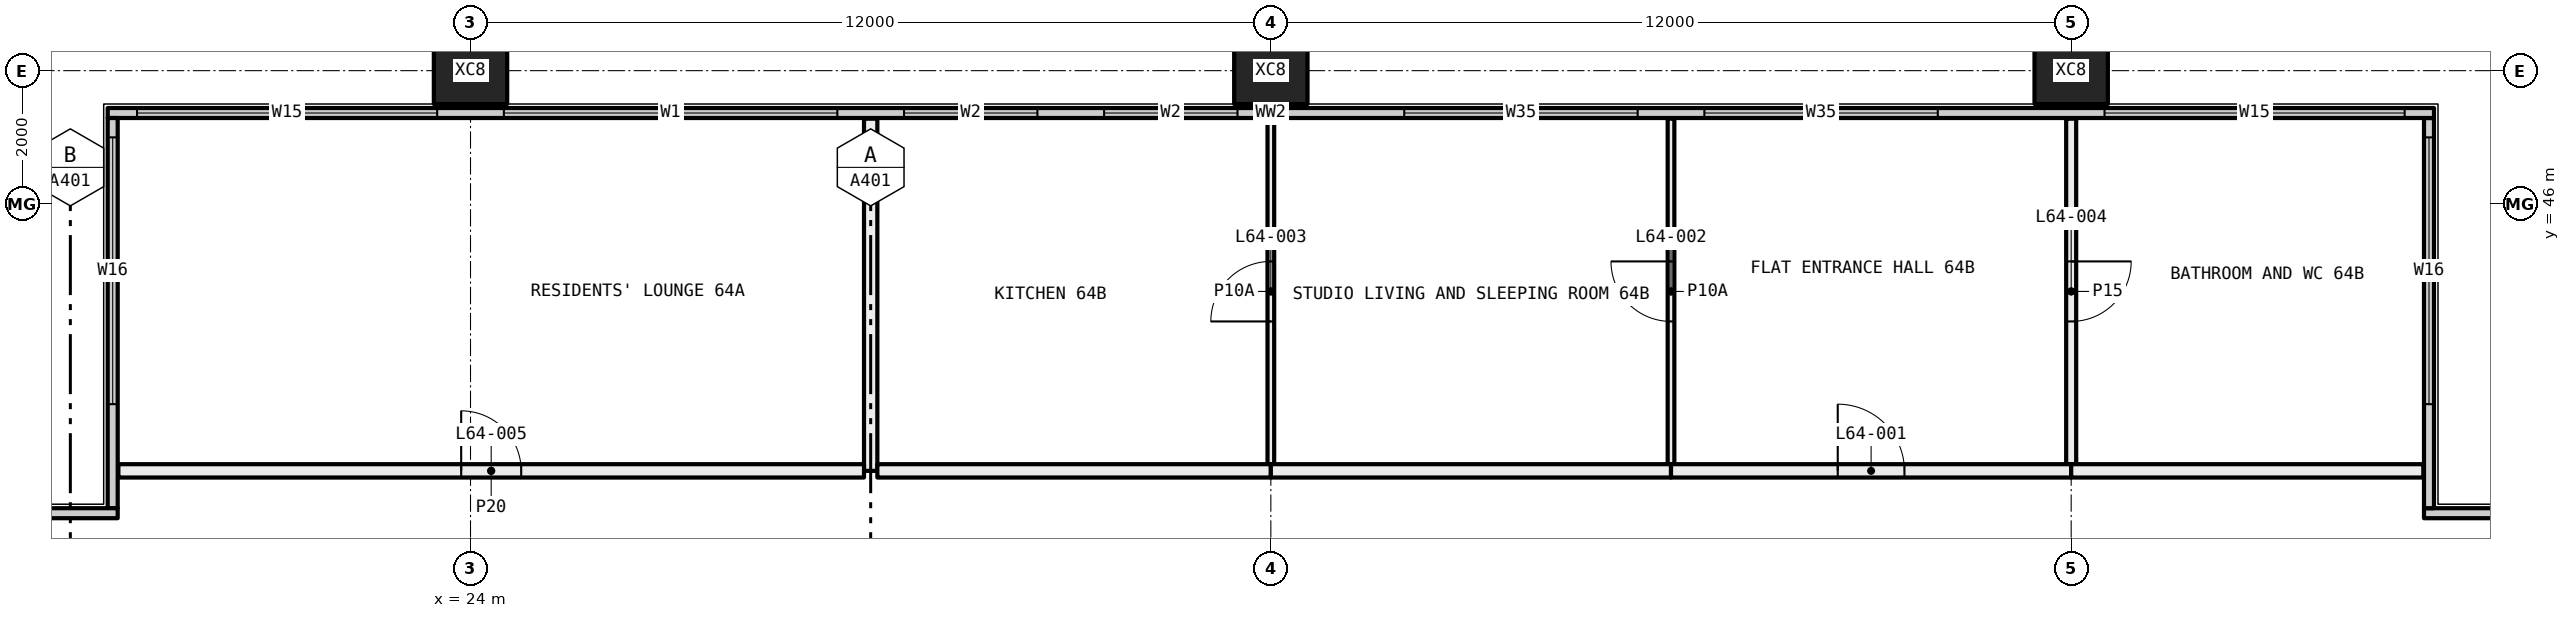
"""IFC4 building model, lengths in metres.
Left out: names, types, materials, properties, quantities, classifications, styles, units other than length and angle.
Written with IfcOpenShell. Run it as: python <this file> out.ifc"""

import sys

from ifc_helpers import new_model, si_unit, direction, frame, frame_2d, origin, origin_2d, place, context, subcontext, project, spatial, rectangle, hollow_rectangle, extrude, element, fill, save


model = new_model("IFC4")
c1 = context("Model", 3, precision=1e-05, world=origin(), true_north=direction((0.0, 1.0)))
c2 = subcontext(c1, "Body", "Model", "MODEL_VIEW")
j1 = project(units=[si_unit("LENGTHUNIT", "METRE"), si_unit("PLANEANGLEUNIT", "RADIAN")], contexts=[c1])
p1 = place(None, origin())
s1 = spatial("IfcSite", under=j1, at=p1, CompositionType="ELEMENT")
p2 = place(p1, origin())
s2 = spatial("IfcBuilding", under=s1, at=p2, CompositionType="ELEMENT")
p3 = place(p2, frame((0.0, 0.0, 238.65)))
s3 = spatial("IfcBuildingStorey", under=s2, at=p3, CompositionType="ELEMENT", Elevation=238.65)
for number, where, z_axis, x_axis in (
    (1, (24.0, 48.0, -0.4), (0.0, 0.0, 1.0), (1.0, 0.0, 0.0)),
    (2, (36.0, 48.0, -0.4), (0.0, 0.0, 1.0), (1.0, 0.0, 0.0)),
    (3, (48.0, 48.0, -0.4), (0.0, 0.0, 1.0), (1.0, 0.0, 0.0)),
):
    element("IfcColumn", number, at=place(p3, frame(where, z_axis=z_axis, x_axis=x_axis)), inside=s3, PredefinedType="COLUMN", context=c2, shape_type="SweptSolid", body=[
        extrude(hollow_rectangle(XDim=1.1, YDim=1.0, WallThickness=0.04, at=origin_2d()), origin(), (0.0, 0.0, 1.0), 3.45),
    ])
p4 = place(p3, frame((53.29, 41.365, 0.0), z_axis=(0.0, 0.0, 1.0), x_axis=(1.0, 0.0, 0.0)))
e4 = element("IfcWall", 4, at=p4, inside=s3, PredefinedType="ELEMENTEDWALL", context=c2, shape_type="SweptSolid", body=[
    extrude(rectangle(XDim=6.15, YDim=0.15, at=frame_2d((3.075, 0.0))), origin(), (0.0, 0.0, 1.0), 3.05),
])
p5 = place(p4, frame((1.71, 0.0, 0.45)))
e5 = element("IfcOpeningElement", 5, at=p5, cuts=e4, PredefinedType="OPENING", context=c2, shape_type="SweptSolid", body=[
    extrude(rectangle(XDim=4.0, YDim=2.55, at=frame_2d((2.0, 1.275))), frame((0.0, 0.085, 0.0), z_axis=(0.0, -1.0, 0.0), x_axis=(1.0, 0.0, 0.0)), (0.0, 0.0, 1.0), 0.17),
])
p6 = place(p3, frame((53.365, 41.44, 0.0), z_axis=(0.0, 0.0, 1.0), x_axis=(0.0, 1.0, 0.0)))
e6 = element("IfcWall", 6, at=p6, inside=s3, PredefinedType="ELEMENTEDWALL", context=c2, shape_type="SweptSolid", body=[
    extrude(rectangle(XDim=5.85, YDim=0.15, at=frame_2d((2.925, 0.0))), origin(), (0.0, 0.0, 1.0), 3.05),
])
p7 = place(p6, frame((1.56, 0.0, 0.45)))
e7 = element("IfcOpeningElement", 7, at=p7, cuts=e6, PredefinedType="OPENING", context=c2, shape_type="SweptSolid", body=[
    extrude(rectangle(XDim=4.0, YDim=2.55, at=frame_2d((2.0, 1.275))), frame((0.0, 0.085, 0.0), z_axis=(0.0, -1.0, 0.0), x_axis=(1.0, 0.0, 0.0)), (0.0, 0.0, 1.0), 0.17),
])
p8 = place(p3, frame((18.56, 47.365, 0.0), z_axis=(0.0, 0.0, 1.0), x_axis=(1.0, 0.0, 0.0)))
e8 = element("IfcWall", 8, at=p8, inside=s3, PredefinedType="ELEMENTEDWALL", context=c2, shape_type="SweptSolid", body=[
    extrude(rectangle(XDim=34.88, YDim=0.15, at=frame_2d((17.44, 0.0))), origin(), (0.0, 0.0, 1.0), 3.05),
])
p9 = place(p8, frame((0.44, 0.0, 0.45)))
e9 = element("IfcOpeningElement", 9, at=p9, cuts=e8, PredefinedType="OPENING", context=c2, shape_type="SweptSolid", body=[
    extrude(rectangle(XDim=4.5, YDim=2.55, at=frame_2d((2.25, 1.275))), frame((0.0, 0.085, 0.0), z_axis=(0.0, -1.0, 0.0), x_axis=(1.0, 0.0, 0.0)), (0.0, 0.0, 1.0), 0.17),
])
p10 = place(p8, frame((5.94, 0.0, 0.45)))
e10 = element("IfcOpeningElement", 10, at=p10, cuts=e8, PredefinedType="OPENING", context=c2, shape_type="SweptSolid", body=[
    extrude(rectangle(XDim=5.0, YDim=2.55, at=frame_2d((2.5, 1.275))), frame((0.0, 0.085, 0.0), z_axis=(0.0, -1.0, 0.0), x_axis=(1.0, 0.0, 0.0)), (0.0, 0.0, 1.0), 0.17),
])
p11 = place(p8, frame((11.94, 0.0, 0.45)))
e11 = element("IfcOpeningElement", 11, at=p11, cuts=e8, PredefinedType="OPENING", context=c2, shape_type="SweptSolid", body=[
    extrude(rectangle(XDim=2.0, YDim=2.55, at=frame_2d((1.0, 1.275))), frame((0.0, 0.085, 0.0), z_axis=(0.0, -1.0, 0.0), x_axis=(1.0, 0.0, 0.0)), (0.0, 0.0, 1.0), 0.17),
])
p12 = place(p8, frame((14.94, 0.0, 0.45)))
e12 = element("IfcOpeningElement", 12, at=p12, cuts=e8, PredefinedType="OPENING", context=c2, shape_type="SweptSolid", body=[
    extrude(rectangle(XDim=2.0, YDim=2.55, at=frame_2d((1.0, 1.275))), frame((0.0, 0.085, 0.0), z_axis=(0.0, -1.0, 0.0), x_axis=(1.0, 0.0, 0.0)), (0.0, 0.0, 1.0), 0.17),
])
p13 = place(p8, frame((19.44, 0.0, 0.45)))
e13 = element("IfcOpeningElement", 13, at=p13, cuts=e8, PredefinedType="OPENING", context=c2, shape_type="SweptSolid", body=[
    extrude(rectangle(XDim=3.5, YDim=2.55, at=frame_2d((1.75, 1.275))), frame((0.0, 0.085, 0.0), z_axis=(0.0, -1.0, 0.0), x_axis=(1.0, 0.0, 0.0)), (0.0, 0.0, 1.0), 0.17),
])
p14 = place(p8, frame((23.94, 0.0, 0.45)))
e14 = element("IfcOpeningElement", 14, at=p14, cuts=e8, PredefinedType="OPENING", context=c2, shape_type="SweptSolid", body=[
    extrude(rectangle(XDim=3.5, YDim=2.55, at=frame_2d((1.75, 1.275))), frame((0.0, 0.085, 0.0), z_axis=(0.0, -1.0, 0.0), x_axis=(1.0, 0.0, 0.0)), (0.0, 0.0, 1.0), 0.17),
])
p15 = place(p8, frame((29.94, 0.0, 0.45)))
e15 = element("IfcOpeningElement", 15, at=p15, cuts=e8, PredefinedType="OPENING", context=c2, shape_type="SweptSolid", body=[
    extrude(rectangle(XDim=4.5, YDim=2.55, at=frame_2d((2.25, 1.275))), frame((0.0, 0.085, 0.0), z_axis=(0.0, -1.0, 0.0), x_axis=(1.0, 0.0, 0.0)), (0.0, 0.0, 1.0), 0.17),
])
p16 = place(p3, frame((18.635, 41.44, 0.0), z_axis=(0.0, 0.0, 1.0), x_axis=(0.0, 1.0, 0.0)))
e16 = element("IfcWall", 16, at=p16, inside=s3, PredefinedType="ELEMENTEDWALL", context=c2, shape_type="SweptSolid", body=[
    extrude(rectangle(XDim=5.85, YDim=0.15, at=frame_2d((2.925, 0.0))), origin(), (0.0, 0.0, 1.0), 3.05),
])
p17 = place(p16, frame((1.56, 0.0, 0.45)))
e17 = element("IfcOpeningElement", 17, at=p17, cuts=e16, PredefinedType="OPENING", context=c2, shape_type="SweptSolid", body=[
    extrude(rectangle(XDim=4.0, YDim=2.55, at=frame_2d((2.0, 1.275))), frame((0.0, 0.085, 0.0), z_axis=(0.0, -1.0, 0.0), x_axis=(1.0, 0.0, 0.0)), (0.0, 0.0, 1.0), 0.17),
])
p18 = place(p3, frame((12.56, 41.365, 0.0), z_axis=(0.0, 0.0, 1.0), x_axis=(1.0, 0.0, 0.0)))
e18 = element("IfcWall", 18, at=p18, inside=s3, PredefinedType="ELEMENTEDWALL", context=c2, shape_type="SweptSolid", body=[
    extrude(rectangle(XDim=6.15, YDim=0.15, at=frame_2d((3.075, 0.0))), origin(), (0.0, 0.0, 1.0), 3.05),
])
p19 = place(p18, frame((0.44, 0.0, 0.45)))
e19 = element("IfcOpeningElement", 19, at=p19, cuts=e18, PredefinedType="OPENING", context=c2, shape_type="SweptSolid", body=[
    extrude(rectangle(XDim=4.0, YDim=2.55, at=frame_2d((2.0, 1.275))), frame((0.0, 0.085, 0.0), z_axis=(0.0, -1.0, 0.0), x_axis=(1.0, 0.0, 0.0)), (0.0, 0.0, 1.0), 0.17),
])
p20 = place(p3, frame((30.0, 42.0, 0.0), z_axis=(0.0, 0.0, 1.0), x_axis=(0.0, 1.0, 0.0)))
e20 = element("IfcWall", 20, at=p20, inside=s3, PredefinedType="PARTITIONING", context=c2, shape_type="SweptSolid", body=[
    extrude(rectangle(XDim=5.28, YDim=0.2, at=frame_2d((2.64, 0.0))), origin(), (0.0, 0.0, 1.0), 3.05),
])
p21 = place(p3, frame((18.72, 42.0, 0.0), z_axis=(0.0, 0.0, 1.0), x_axis=(1.0, 0.0, 0.0)))
e21 = element("IfcWall", 21, at=p21, inside=s3, PredefinedType="PARTITIONING", context=c2, shape_type="SweptSolid", body=[
    extrude(rectangle(XDim=11.18, YDim=0.2, at=frame_2d((5.59, 0.0))), origin(), (0.0, 0.0, 1.0), 3.05),
])
p22 = place(p21, frame((5.14, 0.0, 0.0)))
e22 = element("IfcOpeningElement", 22, at=p22, cuts=e21, PredefinedType="OPENING", context=c2, shape_type="SweptSolid", body=[
    extrude(rectangle(XDim=0.9, YDim=2.1, at=frame_2d((0.45, 1.05))), frame((0.0, 0.11, 0.0), z_axis=(0.0, -1.0, 0.0), x_axis=(1.0, 0.0, 0.0)), (0.0, 0.0, 1.0), 0.22),
])
p23 = place(p3, frame((36.0, 42.1, 0.0), z_axis=(0.0, 0.0, 1.0), x_axis=(0.0, 1.0, 0.0)))
e23 = element("IfcWall", 23, at=p23, inside=s3, PredefinedType="PARTITIONING", context=c2, shape_type="SweptSolid", body=[
    extrude(rectangle(XDim=5.18, YDim=0.1, at=frame_2d((2.59, 0.0))), origin(), (0.0, 0.0, 1.0), 2.45),
])
p24 = place(p23, frame((2.14, 0.0, 0.0)))
e24 = element("IfcOpeningElement", 24, at=p24, cuts=e23, PredefinedType="OPENING", context=c2, shape_type="SweptSolid", body=[
    extrude(rectangle(XDim=0.9, YDim=2.1, at=frame_2d((0.45, 1.05))), frame((0.0, 0.06, 0.0), z_axis=(0.0, -1.0, 0.0), x_axis=(1.0, 0.0, 0.0)), (0.0, 0.0, 1.0), 0.12),
])
p25 = place(p3, frame((30.1, 42.0, 0.0), z_axis=(0.0, 0.0, 1.0), x_axis=(1.0, 0.0, 0.0)))
e25 = element("IfcWall", 25, at=p25, inside=s3, PredefinedType="PARTITIONING", context=c2, shape_type="SweptSolid", body=[
    extrude(rectangle(XDim=5.9, YDim=0.2, at=frame_2d((2.95, 0.0))), origin(), (0.0, 0.0, 1.0), 2.45),
])
p26 = place(p3, frame((42.0, 42.1, 0.0), z_axis=(0.0, 0.0, 1.0), x_axis=(0.0, 1.0, 0.0)))
e26 = element("IfcWall", 26, at=p26, inside=s3, PredefinedType="PARTITIONING", context=c2, shape_type="SweptSolid", body=[
    extrude(rectangle(XDim=5.18, YDim=0.1, at=frame_2d((2.59, 0.0))), origin(), (0.0, 0.0, 1.0), 3.05),
])
p27 = place(p26, frame((2.14, 0.0, 0.0)))
e27 = element("IfcOpeningElement", 27, at=p27, cuts=e26, PredefinedType="OPENING", context=c2, shape_type="SweptSolid", body=[
    extrude(rectangle(XDim=0.9, YDim=2.1, at=frame_2d((0.45, 1.05))), frame((0.0, 0.06, 0.0), z_axis=(0.0, -1.0, 0.0), x_axis=(1.0, 0.0, 0.0)), (0.0, 0.0, 1.0), 0.12),
])
p28 = place(p3, frame((36.0, 42.0, 0.0), z_axis=(0.0, 0.0, 1.0), x_axis=(1.0, 0.0, 0.0)))
e28 = element("IfcWall", 28, at=p28, inside=s3, PredefinedType="PARTITIONING", context=c2, shape_type="SweptSolid", body=[
    extrude(rectangle(XDim=6.0, YDim=0.2, at=frame_2d((3.0, 0.0))), origin(), (0.0, 0.0, 1.0), 2.45),
])
p29 = place(p3, frame((48.0, 42.1, 0.0), z_axis=(0.0, 0.0, 1.0), x_axis=(0.0, 1.0, 0.0)))
e29 = element("IfcWall", 29, at=p29, inside=s3, PredefinedType="PARTITIONING", context=c2, shape_type="SweptSolid", body=[
    extrude(rectangle(XDim=5.18, YDim=0.15, at=frame_2d((2.59, 0.0))), origin(), (0.0, 0.0, 1.0), 3.05),
])
p30 = place(p29, frame((2.14, 0.0, 0.0)))
e30 = element("IfcOpeningElement", 30, at=p30, cuts=e29, PredefinedType="OPENING", context=c2, shape_type="SweptSolid", body=[
    extrude(rectangle(XDim=0.9, YDim=2.1, at=frame_2d((0.45, 1.05))), frame((0.0, 0.085, 0.0), z_axis=(0.0, -1.0, 0.0), x_axis=(1.0, 0.0, 0.0)), (0.0, 0.0, 1.0), 0.17),
])
p31 = place(p3, frame((42.0, 42.0, 0.0), z_axis=(0.0, 0.0, 1.0), x_axis=(1.0, 0.0, 0.0)))
e31 = element("IfcWall", 31, at=p31, inside=s3, PredefinedType="PARTITIONING", context=c2, shape_type="SweptSolid", body=[
    extrude(rectangle(XDim=6.0, YDim=0.2, at=frame_2d((3.0, 0.0))), origin(), (0.0, 0.0, 1.0), 3.05),
])
p32 = place(p31, frame((2.5, 0.0, 0.0)))
e32 = element("IfcOpeningElement", 32, at=p32, cuts=e31, PredefinedType="OPENING", context=c2, shape_type="SweptSolid", body=[
    extrude(rectangle(XDim=1.0, YDim=2.1, at=frame_2d((0.5, 1.05))), frame((0.0, 0.11, 0.0), z_axis=(0.0, -1.0, 0.0), x_axis=(1.0, 0.0, 0.0)), (0.0, 0.0, 1.0), 0.22),
])
p33 = place(p3, frame((48.0, 42.0, 0.0), z_axis=(0.0, 0.0, 1.0), x_axis=(1.0, 0.0, 0.0)))
e33 = element("IfcWall", 33, at=p33, inside=s3, PredefinedType="PARTITIONING", context=c2, shape_type="SweptSolid", body=[
    extrude(rectangle(XDim=5.28, YDim=0.2, at=frame_2d((2.64, 0.0))), origin(), (0.0, 0.0, 1.0), 3.05),
])
p34 = place(p7, origin())
e34 = element("IfcWindow", 34, at=p34, inside=s3, PartitioningType="SINGLE_PANEL", PredefinedType="WINDOW", context=c2, shape_type="SweptSolid", body=[
    extrude(rectangle(XDim=4.0, YDim=2.55, at=frame_2d((2.0, 1.275))), frame((0.0, 0.03, 0.0), z_axis=(0.0, -1.0, 0.0), x_axis=(1.0, 0.0, 0.0)), (0.0, 0.0, 1.0), 0.06),
])
fill(e7, e34)
p35 = place(p9, origin())
e35 = element("IfcWindow", 35, at=p35, inside=s3, PartitioningType="SINGLE_PANEL", PredefinedType="WINDOW", context=c2, shape_type="SweptSolid", body=[
    extrude(rectangle(XDim=4.5, YDim=2.55, at=frame_2d((2.25, 1.275))), frame((0.0, 0.03, 0.0), z_axis=(0.0, -1.0, 0.0), x_axis=(1.0, 0.0, 0.0)), (0.0, 0.0, 1.0), 0.06),
])
fill(e9, e35)
p36 = place(p10, origin())
e36 = element("IfcWindow", 36, at=p36, inside=s3, PartitioningType="SINGLE_PANEL", PredefinedType="WINDOW", context=c2, shape_type="SweptSolid", body=[
    extrude(rectangle(XDim=5.0, YDim=2.55, at=frame_2d((2.5, 1.275))), frame((0.0, 0.03, 0.0), z_axis=(0.0, -1.0, 0.0), x_axis=(1.0, 0.0, 0.0)), (0.0, 0.0, 1.0), 0.06),
])
fill(e10, e36)
p37 = place(p11, origin())
e37 = element("IfcWindow", 37, at=p37, inside=s3, PartitioningType="SINGLE_PANEL", PredefinedType="WINDOW", context=c2, shape_type="SweptSolid", body=[
    extrude(rectangle(XDim=2.0, YDim=2.55, at=frame_2d((1.0, 1.275))), frame((0.0, 0.03, 0.0), z_axis=(0.0, -1.0, 0.0), x_axis=(1.0, 0.0, 0.0)), (0.0, 0.0, 1.0), 0.06),
])
fill(e11, e37)
p38 = place(p12, origin())
e38 = element("IfcWindow", 38, at=p38, inside=s3, PartitioningType="SINGLE_PANEL", PredefinedType="WINDOW", context=c2, shape_type="SweptSolid", body=[
    extrude(rectangle(XDim=2.0, YDim=2.55, at=frame_2d((1.0, 1.275))), frame((0.0, 0.03, 0.0), z_axis=(0.0, -1.0, 0.0), x_axis=(1.0, 0.0, 0.0)), (0.0, 0.0, 1.0), 0.06),
])
fill(e12, e38)
p39 = place(p13, origin())
e39 = element("IfcWindow", 39, at=p39, inside=s3, PartitioningType="SINGLE_PANEL", PredefinedType="WINDOW", context=c2, shape_type="SweptSolid", body=[
    extrude(rectangle(XDim=3.5, YDim=2.55, at=frame_2d((1.75, 1.275))), frame((0.0, 0.03, 0.0), z_axis=(0.0, -1.0, 0.0), x_axis=(1.0, 0.0, 0.0)), (0.0, 0.0, 1.0), 0.06),
])
fill(e13, e39)
p40 = place(p14, origin())
e40 = element("IfcWindow", 40, at=p40, inside=s3, PartitioningType="SINGLE_PANEL", PredefinedType="WINDOW", context=c2, shape_type="SweptSolid", body=[
    extrude(rectangle(XDim=3.5, YDim=2.55, at=frame_2d((1.75, 1.275))), frame((0.0, 0.03, 0.0), z_axis=(0.0, -1.0, 0.0), x_axis=(1.0, 0.0, 0.0)), (0.0, 0.0, 1.0), 0.06),
])
fill(e14, e40)
p41 = place(p15, origin())
e41 = element("IfcWindow", 41, at=p41, inside=s3, PartitioningType="SINGLE_PANEL", PredefinedType="WINDOW", context=c2, shape_type="SweptSolid", body=[
    extrude(rectangle(XDim=4.5, YDim=2.55, at=frame_2d((2.25, 1.275))), frame((0.0, 0.03, 0.0), z_axis=(0.0, -1.0, 0.0), x_axis=(1.0, 0.0, 0.0)), (0.0, 0.0, 1.0), 0.06),
])
fill(e15, e41)
p42 = place(p17, origin())
e42 = element("IfcWindow", 42, at=p42, inside=s3, PartitioningType="SINGLE_PANEL", PredefinedType="WINDOW", context=c2, shape_type="SweptSolid", body=[
    extrude(rectangle(XDim=4.0, YDim=2.55, at=frame_2d((2.0, 1.275))), frame((0.0, 0.03, 0.0), z_axis=(0.0, -1.0, 0.0), x_axis=(1.0, 0.0, 0.0)), (0.0, 0.0, 1.0), 0.06),
])
fill(e17, e42)
p43 = place(p32, origin())
e43 = element("IfcDoor", 43, at=p43, inside=s3, OperationType="SINGLE_SWING_RIGHT", PredefinedType="DOOR", context=c2, shape_type="SweptSolid", body=[
    extrude(rectangle(XDim=1.0, YDim=2.1, at=frame_2d((0.5, 1.05))), frame((0.0, 0.025, 0.0), z_axis=(0.0, -1.0, 0.0), x_axis=(1.0, 0.0, 0.0)), (0.0, 0.0, 1.0), 0.05),
])
fill(e32, e43)
p44 = place(p27, origin())
e44 = element("IfcDoor", 44, at=p44, inside=s3, OperationType="SINGLE_SWING_LEFT", PredefinedType="DOOR", context=c2, shape_type="SweptSolid", body=[
    extrude(rectangle(XDim=0.9, YDim=2.1, at=frame_2d((0.45, 1.05))), frame((0.0, 0.025, 0.0), z_axis=(0.0, -1.0, 0.0), x_axis=(1.0, 0.0, 0.0)), (0.0, 0.0, 1.0), 0.05),
])
fill(e27, e44)
p45 = place(p24, origin())
e45 = element("IfcDoor", 45, at=p45, inside=s3, OperationType="SINGLE_SWING_RIGHT", PredefinedType="DOOR", context=c2, shape_type="SweptSolid", body=[
    extrude(rectangle(XDim=0.9, YDim=2.1, at=frame_2d((0.45, 1.05))), frame((0.0, 0.025, 0.0), z_axis=(0.0, -1.0, 0.0), x_axis=(1.0, 0.0, 0.0)), (0.0, 0.0, 1.0), 0.05),
])
fill(e24, e45)
p46 = place(p30, frame((0.9, 0.0, 0.0), x_axis=(-1.0, 0.0, 0.0)))
e46 = element("IfcDoor", 46, at=p46, inside=s3, OperationType="SINGLE_SWING_RIGHT", PredefinedType="DOOR", context=c2, shape_type="SweptSolid", body=[
    extrude(rectangle(XDim=0.9, YDim=2.1, at=frame_2d((0.45, 1.05))), frame((0.0, 0.025, 0.0), z_axis=(0.0, -1.0, 0.0), x_axis=(1.0, 0.0, 0.0)), (0.0, 0.0, 1.0), 0.05),
])
fill(e30, e46)
p47 = place(p22, origin())
e47 = element("IfcDoor", 47, at=p47, inside=s3, OperationType="SINGLE_SWING_RIGHT", PredefinedType="DOOR", context=c2, shape_type="SweptSolid", body=[
    extrude(rectangle(XDim=0.9, YDim=2.1, at=frame_2d((0.45, 1.05))), frame((0.0, 0.025, 0.0), z_axis=(0.0, -1.0, 0.0), x_axis=(1.0, 0.0, 0.0)), (0.0, 0.0, 1.0), 0.05),
])
fill(e22, e47)
save(model, sys.argv[1])
